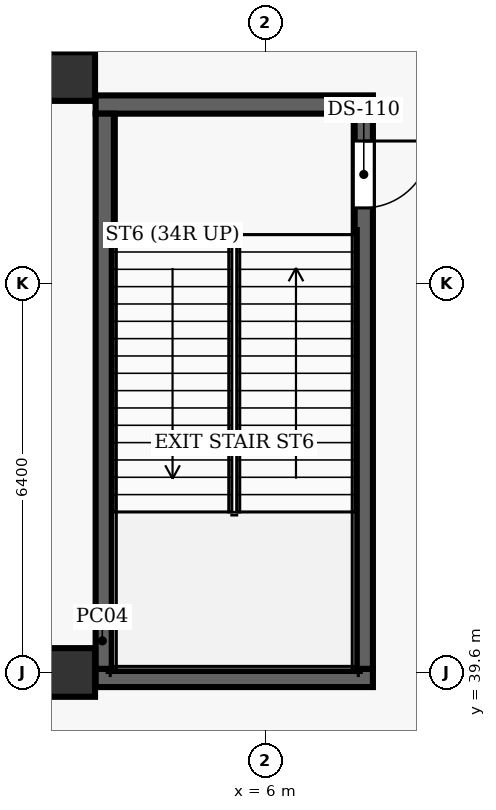
"""IFC4 building model, lengths in metres.
Left out: names, types, materials, properties, quantities, classifications, styles, units other than length and angle.
Written with IfcOpenShell. Run it as: python <this file> out.ifc"""

import sys

from ifc_helpers import new_model, si_unit, direction, frame, frame_2d, origin, origin_2d, place, context, subcontext, project, spatial, rectangle, extrude, element, fill, save


model = new_model("IFC4")
c1 = context("Model", 3, precision=1e-05, world=origin(), true_north=direction((0.0, 1.0)))
c2 = subcontext(c1, "Body", "Model", "MODEL_VIEW")
j1 = project(units=[si_unit("LENGTHUNIT", "METRE"), si_unit("PLANEANGLEUNIT", "RADIAN")], contexts=[c1])
p1 = place(None, origin())
s1 = spatial("IfcSite", under=j1, at=p1, CompositionType="ELEMENT")
p2 = place(p1, origin())
s2 = spatial("IfcBuilding", under=s1, at=p2, CompositionType="ELEMENT")
p3 = place(p2, frame((0.0, 0.0, 24.0)))
s3 = spatial("IfcBuildingStorey", under=s2, at=p3, CompositionType="ELEMENT", Elevation=24.0)
for number, where, z_axis, x_axis in (
    (1, (2.8, 39.6, 0.0), (0.0, 0.0, 1.0), (1.0, 0.0, 0.0)),
    (2, (2.8, 49.4, 0.0), (0.0, 0.0, 1.0), (1.0, 0.0, 0.0)),
):
    element("IfcColumn", number, at=place(p3, frame(where, z_axis=z_axis, x_axis=x_axis)), inside=s3, PredefinedType="COLUMN", context=c2, shape_type="SweptSolid", body=[
        extrude(rectangle(XDim=0.8, YDim=0.8, at=origin_2d()), origin(), (0.0, 0.0, 1.0), 6.0),
    ])
for number, where, z_axis, x_axis in (
    (3, (3.21, 39.51, 0.0), (0.0, 0.0, 1.0), (1.0, 0.0, 0.0)),
    (4, (3.21, 48.94, 0.0), (0.0, 0.0, 1.0), (1.0, 0.0, 0.0)),
):
    element("IfcWall", number, at=place(p3, frame(where, z_axis=z_axis, x_axis=x_axis)), inside=s3, PredefinedType="SHEAR", context=c2, shape_type="SweptSolid", body=[
        extrude(rectangle(XDim=4.56, YDim=0.3, at=frame_2d((2.28, 0.0))), origin(), (0.0, 0.0, 1.0), 6.0),
    ])
p4 = place(p3, frame((3.36, 39.66, 0.0), z_axis=(0.0, 0.0, 1.0), x_axis=(0.0, 1.0, 0.0)))
e5 = element("IfcWall", 5, at=p4, inside=s3, PredefinedType="SHEAR", context=c2, shape_type="SweptSolid", body=[
    extrude(rectangle(XDim=9.13, YDim=0.3, at=frame_2d((4.565, 0.0))), origin(), (0.0, 0.0, 1.0), 6.0),
])
p5 = place(p3, frame((7.62, 48.79, 0.0), z_axis=(0.0, 0.0, 1.0), x_axis=(0.0, -1.0, 0.0)))
e6 = element("IfcWall", 6, at=p5, inside=s3, PredefinedType="SHEAR", context=c2, shape_type="SweptSolid", body=[
    extrude(rectangle(XDim=9.13, YDim=0.3, at=frame_2d((4.565, 0.0))), origin(), (0.0, 0.0, 1.0), 6.0),
])
p6 = place(p5, frame((0.45, 0.0, 0.0)))
e7 = element("IfcOpeningElement", 7, at=p6, cuts=e6, PredefinedType="OPENING", context=c2, shape_type="SweptSolid", body=[
    extrude(rectangle(XDim=1.1, YDim=2.15, at=frame_2d((0.55, 1.075))), frame((0.0, 0.16, 0.0), z_axis=(0.0, -1.0, 0.0), x_axis=(1.0, 0.0, 0.0)), (0.0, 0.0, 1.0), 0.32),
])
p7 = place(p6, origin())
e8 = element("IfcDoor", 8, at=p7, inside=s3, OperationType="SINGLE_SWING_LEFT", PredefinedType="DOOR", context=c2, shape_type="SweptSolid", body=[
    extrude(rectangle(XDim=1.1, YDim=2.15, at=frame_2d((0.55, 1.075))), frame((0.0, 0.025, 0.0), z_axis=(0.0, -1.0, 0.0), x_axis=(1.0, 0.0, 0.0)), (0.0, 0.0, 1.0), 0.05),
])
fill(e7, e8)
save(model, sys.argv[1])
